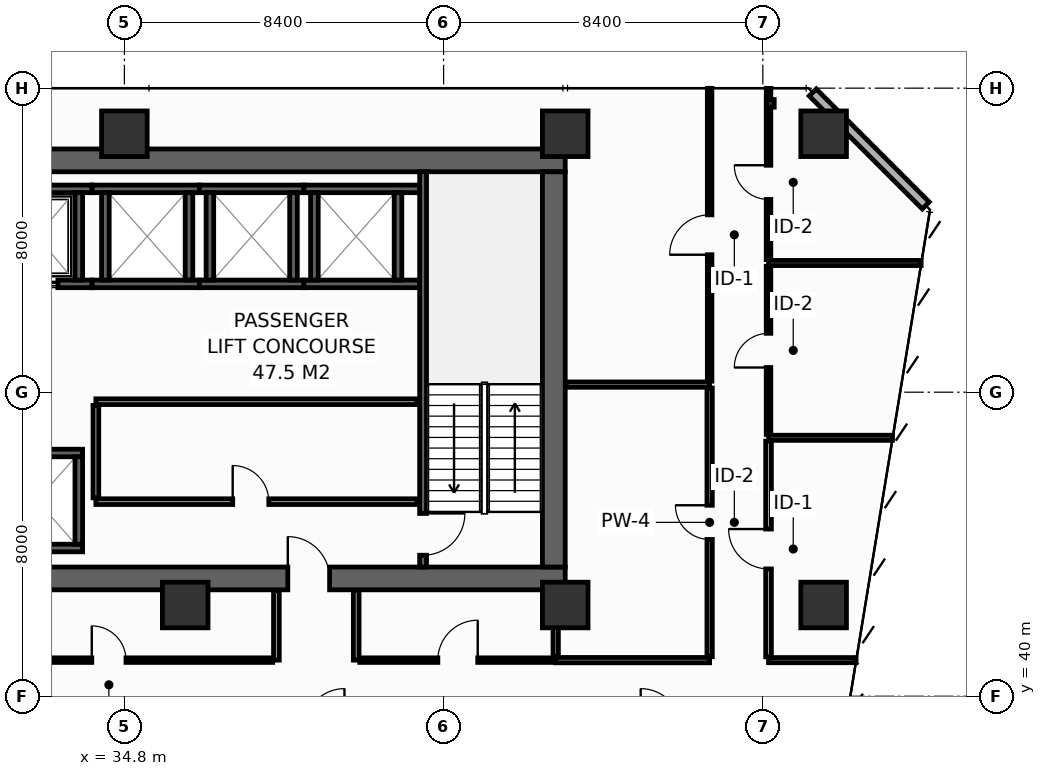
"""IFC4 building model, lengths in metres.
Left out: names, types, materials, properties, quantities, classifications, styles, units other than length and angle.
Written with IfcOpenShell. Run it as: python <this file> out.ifc"""

import sys

from ifc_helpers import new_model, si_unit, direction, frame, frame_2d, origin, origin_2d, place, context, subcontext, project, spatial, rectangle, hollow_rectangle, extrude, element, fill, save


model = new_model("IFC4")
c1 = context("Model", 3, precision=1e-05, world=origin(), true_north=direction((0.0, 1.0)))
c2 = subcontext(c1, "Body", "Model", "MODEL_VIEW")
j1 = project(units=[si_unit("LENGTHUNIT", "METRE"), si_unit("PLANEANGLEUNIT", "RADIAN")], contexts=[c1])
p1 = place(None, origin())
s1 = spatial("IfcSite", under=j1, at=p1, CompositionType="ELEMENT")
p2 = place(p1, origin())
s2 = spatial("IfcBuilding", under=s1, at=p2, CompositionType="ELEMENT")
p3 = place(p2, frame((0.0, 0.0, 47.2)))
s3 = spatial("IfcBuildingStorey", under=s2, at=p3, CompositionType="ELEMENT", Elevation=47.2)
p4 = place(p3, frame((13.5, 43.1, 0.0), z_axis=(0.0, 0.0, 1.0), x_axis=(1.0, 0.0, 0.0)))
e1 = element("IfcWall", 1, at=p4, inside=s3, PredefinedType="SHEAR", context=c2, shape_type="SweptSolid", body=[
    extrude(rectangle(XDim=32.9, YDim=0.6, at=frame_2d((16.45, 0.0))), origin(), (0.0, 0.0, 1.0), 4.15),
])
p5 = place(p4, frame((5.4, 0.0, 0.0)))
e2 = element("IfcOpeningElement", 2, at=p5, cuts=e1, PredefinedType="OPENING", context=c2, shape_type="SweptSolid", body=[
    extrude(rectangle(XDim=1.1, YDim=2.15, at=frame_2d((0.55, 1.075))), frame((0.0, 0.31, 0.0), z_axis=(0.0, -1.0, 0.0), x_axis=(1.0, 0.0, 0.0)), (0.0, 0.0, 1.0), 0.62),
])
p6 = place(p4, frame((25.6, 0.0, 0.0)))
e3 = element("IfcOpeningElement", 3, at=p6, cuts=e1, PredefinedType="OPENING", context=c2, shape_type="SweptSolid", body=[
    extrude(rectangle(XDim=1.1, YDim=2.15, at=frame_2d((0.55, 1.075))), frame((0.0, 0.31, 0.0), z_axis=(0.0, -1.0, 0.0), x_axis=(1.0, 0.0, 0.0)), (0.0, 0.0, 1.0), 0.62),
])
p7 = place(p3, frame((13.5, 54.1, 0.0), z_axis=(0.0, 0.0, 1.0), x_axis=(1.0, 0.0, 0.0)))
e4 = element("IfcWall", 4, at=p7, inside=s3, PredefinedType="SHEAR", context=c2, shape_type="SweptSolid", body=[
    extrude(rectangle(XDim=32.9, YDim=0.6, at=frame_2d((16.45, 0.0))), origin(), (0.0, 0.0, 1.0), 4.15),
])
p8 = place(p3, frame((46.1, 43.4, 0.0), z_axis=(0.0, 0.0, 1.0), x_axis=(0.0, 1.0, 0.0)))
e5 = element("IfcWall", 5, at=p8, inside=s3, PredefinedType="SHEAR", context=c2, shape_type="SweptSolid", body=[
    extrude(rectangle(XDim=10.4, YDim=0.6, at=frame_2d((5.2, 0.0))), origin(), (0.0, 0.0, 1.0), 4.15),
])
for number, where, z_axis, x_axis in (
    (6, (34.8, 54.8, 0.0), (0.0, 0.0, 1.0), (1.0, 0.0, 0.0)),
    (7, (46.4, 54.8, 0.0), (0.0, 0.0, 1.0), (1.0, 0.0, 0.0)),
    (8, (53.2, 54.8, 0.0), (0.0, 0.0, 1.0), (1.0, 0.0, 0.0)),
    (9, (36.4, 42.4, 0.0), (0.0, 0.0, 1.0), (1.0, 0.0, 0.0)),
    (10, (46.4, 42.4, 0.0), (0.0, 0.0, 1.0), (1.0, 0.0, 0.0)),
    (11, (53.2, 42.4, 0.0), (0.0, 0.0, 1.0), (1.0, 0.0, 0.0)),
):
    element("IfcColumn", number, at=place(p3, frame(where, z_axis=z_axis, x_axis=x_axis)), inside=s3, PredefinedType="COLUMN", context=c2, shape_type="SweptSolid", body=[
        extrude(hollow_rectangle(XDim=1.2, YDim=1.2, WallThickness=0.055, at=origin_2d()), origin(), (0.0, 0.0, 1.0), 4.4),
    ])
p9 = place(p3, frame((51.8, 55.6, 0.0), z_axis=(0.0, 0.0, 1.0), x_axis=(1.0, 0.0, 0.0)))
e12 = element("IfcColumn", 12, at=p9, inside=s3, PredefinedType="PILASTER", context=c2, shape_type="SweptSolid", body=[
    extrude(hollow_rectangle(XDim=0.2, YDim=0.2, WallThickness=0.01, at=origin_2d()), origin(), (0.0, 0.0, 1.0), 4.4),
])
p10 = place(p3, frame((31.125, 50.85, 0.0), z_axis=(0.0, 0.0, 1.0), x_axis=(1.0, 0.0, 0.0)))
e13 = element("IfcWall", 13, at=p10, inside=s3, PredefinedType="SHEAR", context=c2, shape_type="SweptSolid", body=[
    extrude(rectangle(XDim=2.825, YDim=0.2, at=frame_2d((1.413, 0.0))), origin(), (0.0, 0.0, 1.0), 4.15),
])
p11 = place(p10, frame((0.825, 0.0, 0.0)))
e14 = element("IfcOpeningElement", 14, at=p11, cuts=e13, PredefinedType="OPENING", context=c2, shape_type="SweptSolid", body=[
    extrude(rectangle(XDim=1.1, YDim=2.2, at=frame_2d((0.55, 1.1))), frame((0.0, 0.11, 0.0), z_axis=(0.0, -1.0, 0.0), x_axis=(1.0, 0.0, 0.0)), (0.0, 0.0, 1.0), 0.22),
])
p12 = place(p3, frame((31.125, 53.35, 0.0), z_axis=(0.0, 0.0, 1.0), x_axis=(1.0, 0.0, 0.0)))
e15 = element("IfcWall", 15, at=p12, inside=s3, PredefinedType="SHEAR", context=c2, shape_type="SweptSolid", body=[
    extrude(rectangle(XDim=2.825, YDim=0.2, at=frame_2d((1.413, 0.0))), origin(), (0.0, 0.0, 1.0), 4.15),
])
p13 = place(p3, frame((33.6, 50.95, 0.0), z_axis=(0.0, 0.0, 1.0), x_axis=(0.0, 1.0, 0.0)))
e16 = element("IfcWall", 16, at=p13, inside=s3, PredefinedType="SHEAR", context=c2, shape_type="SweptSolid", body=[
    extrude(rectangle(XDim=2.3, YDim=0.2, at=frame_2d((1.15, 0.0))), origin(), (0.0, 0.0, 1.0), 4.15),
])
for number, where, z_axis, x_axis in (
    (17, (31.125, 43.9, 0.0), (0.0, 0.0, 1.0), (1.0, 0.0, 0.0)),
    (18, (31.125, 46.4, 0.0), (0.0, 0.0, 1.0), (1.0, 0.0, 0.0)),
):
    element("IfcWall", number, at=place(p3, frame(where, z_axis=z_axis, x_axis=x_axis)), inside=s3, PredefinedType="SHEAR", context=c2, shape_type="SweptSolid", body=[
        extrude(rectangle(XDim=2.575, YDim=0.2, at=frame_2d((1.288, 0.0))), origin(), (0.0, 0.0, 1.0), 4.15),
    ])
p14 = place(p3, frame((33.6, 44.0, 0.0), z_axis=(0.0, 0.0, 1.0), x_axis=(0.0, 1.0, 0.0)))
e19 = element("IfcWall", 19, at=p14, inside=s3, PredefinedType="SHEAR", context=c2, shape_type="SweptSolid", body=[
    extrude(rectangle(XDim=2.3, YDim=0.2, at=frame_2d((1.15, 0.0))), origin(), (0.0, 0.0, 1.0), 4.15),
])
for number, where, z_axis, x_axis in (
    (20, (33.95, 50.85, 0.0), (0.0, 0.0, 1.0), (1.0, 0.0, 0.0)),
    (21, (33.95, 53.35, 0.0), (0.0, 0.0, 1.0), (1.0, 0.0, 0.0)),
):
    element("IfcWall", number, at=place(p3, frame(where, z_axis=z_axis, x_axis=x_axis)), inside=s3, PredefinedType="SHEAR", context=c2, shape_type="SweptSolid", body=[
        extrude(rectangle(XDim=2.825, YDim=0.2, at=frame_2d((1.413, 0.0))), origin(), (0.0, 0.0, 1.0), 4.15),
    ])
for number, where, z_axis, x_axis in (
    (22, (34.3, 50.95, 0.0), (0.0, 0.0, 1.0), (0.0, 1.0, 0.0)),
    (23, (36.5, 50.95, 0.0), (0.0, 0.0, 1.0), (0.0, 1.0, 0.0)),
):
    element("IfcWall", number, at=place(p3, frame(where, z_axis=z_axis, x_axis=x_axis)), inside=s3, PredefinedType="SHEAR", context=c2, shape_type="SweptSolid", body=[
        extrude(rectangle(XDim=2.3, YDim=0.2, at=frame_2d((1.15, 0.0))), origin(), (0.0, 0.0, 1.0), 4.15),
    ])
for number, where, z_axis, x_axis in (
    (24, (36.775, 50.85, 0.0), (0.0, 0.0, 1.0), (1.0, 0.0, 0.0)),
    (25, (36.775, 53.35, 0.0), (0.0, 0.0, 1.0), (1.0, 0.0, 0.0)),
):
    element("IfcWall", number, at=place(p3, frame(where, z_axis=z_axis, x_axis=x_axis)), inside=s3, PredefinedType="SHEAR", context=c2, shape_type="SweptSolid", body=[
        extrude(rectangle(XDim=2.75, YDim=0.2, at=frame_2d((1.375, 0.0))), origin(), (0.0, 0.0, 1.0), 4.15),
    ])
for number, where, z_axis, x_axis in (
    (26, (37.05, 50.95, 0.0), (0.0, 0.0, 1.0), (0.0, 1.0, 0.0)),
    (27, (39.25, 50.95, 0.0), (0.0, 0.0, 1.0), (0.0, 1.0, 0.0)),
):
    element("IfcWall", number, at=place(p3, frame(where, z_axis=z_axis, x_axis=x_axis)), inside=s3, PredefinedType="SHEAR", context=c2, shape_type="SweptSolid", body=[
        extrude(rectangle(XDim=2.3, YDim=0.2, at=frame_2d((1.15, 0.0))), origin(), (0.0, 0.0, 1.0), 4.15),
    ])
for number, where, z_axis, x_axis in (
    (28, (39.525, 50.85, 0.0), (0.0, 0.0, 1.0), (1.0, 0.0, 0.0)),
    (29, (39.525, 53.35, 0.0), (0.0, 0.0, 1.0), (1.0, 0.0, 0.0)),
):
    element("IfcWall", number, at=place(p3, frame(where, z_axis=z_axis, x_axis=x_axis)), inside=s3, PredefinedType="SHEAR", context=c2, shape_type="SweptSolid", body=[
        extrude(rectangle(XDim=3.045, YDim=0.2, at=frame_2d((1.522, 0.0))), origin(), (0.0, 0.0, 1.0), 4.15),
    ])
for number, where, z_axis, x_axis in (
    (30, (39.8, 50.95, 0.0), (0.0, 0.0, 1.0), (0.0, 1.0, 0.0)),
    (31, (42.0, 50.95, 0.0), (0.0, 0.0, 1.0), (0.0, 1.0, 0.0)),
):
    element("IfcWall", number, at=place(p3, frame(where, z_axis=z_axis, x_axis=x_axis)), inside=s3, PredefinedType="SHEAR", context=c2, shape_type="SweptSolid", body=[
        extrude(rectangle(XDim=2.3, YDim=0.2, at=frame_2d((1.15, 0.0))), origin(), (0.0, 0.0, 1.0), 4.15),
    ])
p15 = place(p3, frame((42.66, 53.8, 0.0), z_axis=(0.0, 0.0, 1.0), x_axis=(0.0, -1.0, 0.0)))
e32 = element("IfcWall", 32, at=p15, inside=s3, PredefinedType="SHEAR", context=c2, shape_type="SweptSolid", body=[
    extrude(rectangle(XDim=10.4, YDim=0.18, at=frame_2d((5.2, 0.0))), origin(), (0.0, 0.0, 1.0), 4.15),
])
p16 = place(p15, frame((8.99, 0.0, 0.0)))
e33 = element("IfcOpeningElement", 33, at=p16, cuts=e32, PredefinedType="OPENING", context=c2, shape_type="SweptSolid", body=[
    extrude(rectangle(XDim=1.1, YDim=2.15, at=frame_2d((0.55, 1.075))), frame((0.0, 0.1, 0.0), z_axis=(0.0, -1.0, 0.0), x_axis=(1.0, 0.0, 0.0)), (0.0, 0.0, 1.0), 0.2),
])
p17 = place(p3, frame((34.05, 45.12, 0.0), z_axis=(0.0, 0.0, 1.0), x_axis=(1.0, 0.0, 0.0)))
e34 = element("IfcWall", 34, at=p17, inside=s3, PredefinedType="PARTITIONING", context=c2, shape_type="SweptSolid", body=[
    extrude(rectangle(XDim=8.45, YDim=0.15, at=frame_2d((4.225, 0.0))), origin(), (0.0, 0.0, 1.0), 4.15),
])
p18 = place(p17, frame((3.6, 0.0, 0.0)))
e35 = element("IfcOpeningElement", 35, at=p18, cuts=e34, PredefinedType="OPENING", context=c2, shape_type="SweptSolid", body=[
    extrude(rectangle(XDim=0.95, YDim=2.15, at=frame_2d((0.475, 1.075))), frame((0.0, 0.085, 0.0), z_axis=(0.0, -1.0, 0.0), x_axis=(1.0, 0.0, 0.0)), (0.0, 0.0, 1.0), 0.17),
])
p19 = place(p3, frame((34.05, 47.75, 0.0), z_axis=(0.0, 0.0, 1.0), x_axis=(1.0, 0.0, 0.0)))
e36 = element("IfcWall", 36, at=p19, inside=s3, PredefinedType="PARTITIONING", context=c2, shape_type="SweptSolid", body=[
    extrude(rectangle(XDim=8.45, YDim=0.15, at=frame_2d((4.225, 0.0))), origin(), (0.0, 0.0, 1.0), 4.15),
])
p20 = place(p3, frame((34.05, 45.22, 0.0), z_axis=(0.0, 0.0, 1.0), x_axis=(0.0, 1.0, 0.0)))
e37 = element("IfcWall", 37, at=p20, inside=s3, PredefinedType="PARTITIONING", context=c2, shape_type="SweptSolid", body=[
    extrude(rectangle(XDim=2.43, YDim=0.15, at=frame_2d((1.215, 0.0))), origin(), (0.0, 0.0, 1.0), 4.15),
])
p21 = place(p3, frame((55.887, 52.913, 0.0), z_axis=(0.0, 0.0, 1.0), x_axis=(-0.707106781187, 0.707106781187, 0.0)))
e38 = element("IfcWall", 38, at=p21, inside=s3, PredefinedType="STANDARD", context=c2, shape_type="SweptSolid", body=[
    extrude(rectangle(XDim=4.206, YDim=0.26, at=frame_2d((2.103, 0.0))), origin(), (0.0, 0.0, 1.0), 4.15),
])
p22 = place(p3, frame((46.15, 40.95, 0.0), z_axis=(0.0, 0.0, 1.0), x_axis=(1.0, 0.0, 0.0)))
e39 = element("IfcWall", 39, at=p22, inside=s3, PredefinedType="PARTITIONING", context=c2, shape_type="SweptSolid", body=[
    extrude(rectangle(XDim=4.05, YDim=0.14, at=frame_2d((2.025, 0.0))), origin(), (0.0, 0.0, 1.0), 4.15),
])
p23 = place(p3, frame((46.15, 41.04, 0.0), z_axis=(0.0, 0.0, 1.0), x_axis=(0.0, 1.0, 0.0)))
e40 = element("IfcWall", 40, at=p23, inside=s3, PredefinedType="PARTITIONING", context=c2, shape_type="SweptSolid", body=[
    extrude(rectangle(XDim=1.74, YDim=0.14, at=frame_2d((0.87, 0.0))), origin(), (0.0, 0.0, 1.0), 4.15),
])
p24 = place(p3, frame((46.42, 48.2, 0.0), z_axis=(0.0, 0.0, 1.0), x_axis=(1.0, 0.0, 0.0)))
e41 = element("IfcWall", 41, at=p24, inside=s3, PredefinedType="PARTITIONING", context=c2, shape_type="SweptSolid", body=[
    extrude(rectangle(XDim=3.78, YDim=0.14, at=frame_2d((1.89, 0.0))), origin(), (0.0, 0.0, 1.0), 4.15),
])
p25 = place(p3, frame((50.2, 41.04, 0.0), z_axis=(0.0, 0.0, 1.0), x_axis=(0.0, 1.0, 0.0)))
e42 = element("IfcWall", 42, at=p25, inside=s3, PredefinedType="PARTITIONING", context=c2, shape_type="SweptSolid", body=[
    extrude(rectangle(XDim=7.07, YDim=0.14, at=frame_2d((3.535, 0.0))), origin(), (0.0, 0.0, 1.0), 3.335),
])
p26 = place(p25, frame((3.085, 0.0, 0.0)))
e43 = element("IfcOpeningElement", 43, at=p26, cuts=e42, PredefinedType="OPENING", context=c2, shape_type="SweptSolid", body=[
    extrude(rectangle(XDim=0.9, YDim=2.1, at=frame_2d((0.45, 1.05))), frame((0.0, 0.08, 0.0), z_axis=(0.0, -1.0, 0.0), x_axis=(1.0, 0.0, 0.0)), (0.0, 0.0, 1.0), 0.16),
])
p27 = place(p3, frame((50.2, 48.29, 0.0), z_axis=(0.0, 0.0, 1.0), x_axis=(0.0, 1.0, 0.0)))
e44 = element("IfcWall", 44, at=p27, inside=s3, PredefinedType="PARTITIONING", context=c2, shape_type="SweptSolid", body=[
    extrude(rectangle(XDim=7.705, YDim=0.12, at=frame_2d((3.853, 0.0))), origin(), (0.0, 0.0, 1.0), 3.435),
])
p28 = place(p27, frame((3.327, 0.0, 0.0)))
e45 = element("IfcOpeningElement", 45, at=p28, cuts=e44, PredefinedType="OPENING", context=c2, shape_type="SweptSolid", body=[
    extrude(rectangle(XDim=1.05, YDim=2.15, at=frame_2d((0.525, 1.075))), frame((0.0, 0.07, 0.0), z_axis=(0.0, -1.0, 0.0), x_axis=(1.0, 0.0, 0.0)), (0.0, 0.0, 1.0), 0.14),
])
p29 = place(p3, frame((51.75, 40.95, 0.0), z_axis=(0.0, 0.0, 1.0), x_axis=(1.0, 0.0, 0.0)))
e46 = element("IfcWall", 46, at=p29, inside=s3, PredefinedType="PARTITIONING", context=c2, shape_type="SweptSolid", body=[
    extrude(rectangle(XDim=2.303, YDim=0.135, at=frame_2d((1.151, 0.0))), origin(), (0.0, 0.0, 1.0), 3.635),
])
p30 = place(p3, frame((51.75, 46.8, 0.0), z_axis=(0.0, 0.0, 1.0), x_axis=(1.0, 0.0, 0.0)))
e47 = element("IfcWall", 47, at=p30, inside=s3, PredefinedType="PARTITIONING", context=c2, shape_type="SweptSolid", body=[
    extrude(rectangle(XDim=3.262, YDim=0.135, at=frame_2d((1.631, 0.0))), origin(), (0.0, 0.0, 1.0), 3.335),
])
p31 = place(p3, frame((51.75, 51.4, 0.0), z_axis=(0.0, 0.0, 1.0), x_axis=(1.0, 0.0, 0.0)))
e48 = element("IfcWall", 48, at=p31, inside=s3, PredefinedType="PARTITIONING", context=c2, shape_type="SweptSolid", body=[
    extrude(rectangle(XDim=4.015, YDim=0.135, at=frame_2d((2.008, 0.0))), origin(), (0.0, 0.0, 1.0), 3.335),
])
p32 = place(p3, frame((51.75, 41.038, 0.0), z_axis=(0.0, 0.0, 1.0), x_axis=(0.0, 1.0, 0.0)))
e49 = element("IfcWall", 49, at=p32, inside=s3, PredefinedType="PARTITIONING", context=c2, shape_type="SweptSolid", body=[
    extrude(rectangle(XDim=5.675, YDim=0.15, at=frame_2d((2.837, 0.0))), origin(), (0.0, 0.0, 1.0), 3.335),
])
p33 = place(p32, frame((2.312, 0.0, 0.0)))
e50 = element("IfcOpeningElement", 50, at=p33, cuts=e49, PredefinedType="OPENING", context=c2, shape_type="SweptSolid", body=[
    extrude(rectangle(XDim=1.05, YDim=2.15, at=frame_2d((0.525, 1.075))), frame((0.0, 0.085, 0.0), z_axis=(0.0, -1.0, 0.0), x_axis=(1.0, 0.0, 0.0)), (0.0, 0.0, 1.0), 0.17),
])
p34 = place(p3, frame((51.75, 46.887, 0.0), z_axis=(0.0, 0.0, 1.0), x_axis=(0.0, 1.0, 0.0)))
e51 = element("IfcWall", 51, at=p34, inside=s3, PredefinedType="PARTITIONING", context=c2, shape_type="SweptSolid", body=[
    extrude(rectangle(XDim=4.425, YDim=0.12, at=frame_2d((2.212, 0.0))), origin(), (0.0, 0.0, 1.0), 4.15),
])
p35 = place(p34, frame((1.762, 0.0, 0.0)))
e52 = element("IfcOpeningElement", 52, at=p35, cuts=e51, PredefinedType="OPENING", context=c2, shape_type="SweptSolid", body=[
    extrude(rectangle(XDim=0.9, YDim=2.1, at=frame_2d((0.45, 1.05))), frame((0.0, 0.07, 0.0), z_axis=(0.0, -1.0, 0.0), x_axis=(1.0, 0.0, 0.0)), (0.0, 0.0, 1.0), 0.14),
])
p36 = place(p3, frame((51.75, 51.488, 0.0), z_axis=(0.0, 0.0, 1.0), x_axis=(0.0, 1.0, 0.0)))
e53 = element("IfcWall", 53, at=p36, inside=s3, PredefinedType="PARTITIONING", context=c2, shape_type="SweptSolid", body=[
    extrude(rectangle(XDim=4.508, YDim=0.12, at=frame_2d((2.254, 0.0))), origin(), (0.0, 0.0, 1.0), 3.435),
])
p37 = place(p36, frame((1.584, 0.0, 0.0)))
e54 = element("IfcOpeningElement", 54, at=p37, cuts=e53, PredefinedType="OPENING", context=c2, shape_type="SweptSolid", body=[
    extrude(rectangle(XDim=0.9, YDim=2.1, at=frame_2d((0.45, 1.05))), frame((0.0, 0.07, 0.0), z_axis=(0.0, -1.0, 0.0), x_axis=(1.0, 0.0, 0.0)), (0.0, 0.0, 1.0), 0.14),
])
for number, where, z_axis, x_axis in (
    (55, (38.8, 40.95, 0.0), (0.0, 0.0, 1.0), (0.0, 1.0, 0.0)),
    (56, (40.9, 40.95, 0.0), (0.0, 0.0, 1.0), (0.0, 1.0, 0.0)),
):
    element("IfcWall", number, at=place(p3, frame(where, z_axis=z_axis, x_axis=x_axis)), inside=s3, PredefinedType="PARTITIONING", context=c2, shape_type="SweptSolid", body=[
        extrude(rectangle(XDim=1.83, YDim=0.15, at=frame_2d((0.915, 0.0))), origin(), (0.0, 0.0, 1.0), 4.15),
    ])
p38 = place(p3, frame((30.08, 40.95, 0.0), z_axis=(0.0, 0.0, 1.0), x_axis=(1.0, 0.0, 0.0)))
e57 = element("IfcWall", 57, at=p38, inside=s3, PredefinedType="PARTITIONING", context=c2, shape_type="SweptSolid", body=[
    extrude(rectangle(XDim=8.625, YDim=0.12, at=frame_2d((4.312, 0.0))), origin(), (0.0, 0.0, 1.0), 3.335),
])
p39 = place(p38, frame((3.862, 0.0, 0.0)))
e58 = element("IfcOpeningElement", 58, at=p39, cuts=e57, PredefinedType="OPENING", context=c2, shape_type="SweptSolid", body=[
    extrude(rectangle(XDim=0.9, YDim=2.1, at=frame_2d((0.45, 1.05))), frame((0.0, 0.07, 0.0), z_axis=(0.0, -1.0, 0.0), x_axis=(1.0, 0.0, 0.0)), (0.0, 0.0, 1.0), 0.14),
])
p40 = place(p3, frame((40.995, 40.95, 0.0), z_axis=(0.0, 0.0, 1.0), x_axis=(1.0, 0.0, 0.0)))
e59 = element("IfcWall", 59, at=p40, inside=s3, PredefinedType="PARTITIONING", context=c2, shape_type="SweptSolid", body=[
    extrude(rectangle(XDim=5.155, YDim=0.12, at=frame_2d((2.577, 0.0))), origin(), (0.0, 0.0, 1.0), 4.15),
])
p41 = place(p40, frame((2.053, 0.0, 0.0)))
e60 = element("IfcOpeningElement", 60, at=p41, cuts=e59, PredefinedType="OPENING", context=c2, shape_type="SweptSolid", body=[
    extrude(rectangle(XDim=1.05, YDim=2.15, at=frame_2d((0.525, 1.075))), frame((0.0, 0.07, 0.0), z_axis=(0.0, -1.0, 0.0), x_axis=(1.0, 0.0, 0.0)), (0.0, 0.0, 1.0), 0.14),
])
p42 = place(p11, origin())
e61 = element("IfcDoor", 61, at=p42, inside=s3, OperationType="SLIDING_TO_LEFT", PredefinedType="DOOR", context=c2, shape_type="SweptSolid", body=[
    extrude(rectangle(XDim=1.1, YDim=2.2, at=frame_2d((0.55, 1.1))), frame((0.0, 0.025, 0.0), z_axis=(0.0, -1.0, 0.0), x_axis=(1.0, 0.0, 0.0)), (0.0, 0.0, 1.0), 0.05),
])
fill(e14, e61)
p43 = place(p16, origin())
e62 = element("IfcDoor", 62, at=p43, inside=s3, OperationType="SINGLE_SWING_LEFT", PredefinedType="DOOR", context=c2, shape_type="SweptSolid", body=[
    extrude(rectangle(XDim=1.1, YDim=2.15, at=frame_2d((0.55, 1.075))), frame((0.0, 0.025, 0.0), z_axis=(0.0, -1.0, 0.0), x_axis=(1.0, 0.0, 0.0)), (0.0, 0.0, 1.0), 0.05),
])
fill(e33, e62)
p44 = place(p6, origin())
e63 = element("IfcDoor", 63, at=p44, inside=s3, OperationType="SINGLE_SWING_LEFT", PredefinedType="DOOR", context=c2, shape_type="SweptSolid", body=[
    extrude(rectangle(XDim=1.1, YDim=2.15, at=frame_2d((0.55, 1.075))), frame((0.0, 0.025, 0.0), z_axis=(0.0, -1.0, 0.0), x_axis=(1.0, 0.0, 0.0)), (0.0, 0.0, 1.0), 0.05),
])
fill(e3, e63)
p45 = place(p18, origin())
e64 = element("IfcDoor", 64, at=p45, inside=s3, OperationType="SINGLE_SWING_LEFT", PredefinedType="DOOR", context=c2, shape_type="SweptSolid", body=[
    extrude(rectangle(XDim=0.95, YDim=2.15, at=frame_2d((0.475, 1.075))), frame((0.0, 0.025, 0.0), z_axis=(0.0, -1.0, 0.0), x_axis=(1.0, 0.0, 0.0)), (0.0, 0.0, 1.0), 0.05),
])
fill(e35, e64)
p46 = place(p26, origin())
e65 = element("IfcDoor", 65, at=p46, inside=s3, OperationType="SINGLE_SWING_RIGHT", PredefinedType="DOOR", context=c2, shape_type="SweptSolid", body=[
    extrude(rectangle(XDim=0.9, YDim=2.1, at=frame_2d((0.45, 1.05))), frame((0.0, 0.025, 0.0), z_axis=(0.0, -1.0, 0.0), x_axis=(1.0, 0.0, 0.0)), (0.0, 0.0, 1.0), 0.05),
])
fill(e43, e65)
p47 = place(p28, origin())
e66 = element("IfcDoor", 66, at=p47, inside=s3, OperationType="SINGLE_SWING_LEFT", PredefinedType="DOOR", context=c2, shape_type="SweptSolid", body=[
    extrude(rectangle(XDim=1.05, YDim=2.15, at=frame_2d((0.525, 1.075))), frame((0.0, 0.025, 0.0), z_axis=(0.0, -1.0, 0.0), x_axis=(1.0, 0.0, 0.0)), (0.0, 0.0, 1.0), 0.05),
])
fill(e45, e66)
p48 = place(p33, origin())
e67 = element("IfcDoor", 67, at=p48, inside=s3, OperationType="SINGLE_SWING_RIGHT", PredefinedType="DOOR", context=c2, shape_type="SweptSolid", body=[
    extrude(rectangle(XDim=1.05, YDim=2.15, at=frame_2d((0.525, 1.075))), frame((0.0, 0.025, 0.0), z_axis=(0.0, -1.0, 0.0), x_axis=(1.0, 0.0, 0.0)), (0.0, 0.0, 1.0), 0.05),
])
fill(e50, e67)
p49 = place(p35, origin())
e68 = element("IfcDoor", 68, at=p49, inside=s3, OperationType="SINGLE_SWING_LEFT", PredefinedType="DOOR", context=c2, shape_type="SweptSolid", body=[
    extrude(rectangle(XDim=0.9, YDim=2.1, at=frame_2d((0.45, 1.05))), frame((0.0, 0.025, 0.0), z_axis=(0.0, -1.0, 0.0), x_axis=(1.0, 0.0, 0.0)), (0.0, 0.0, 1.0), 0.05),
])
fill(e52, e68)
p50 = place(p37, origin())
e69 = element("IfcDoor", 69, at=p50, inside=s3, OperationType="SINGLE_SWING_RIGHT", PredefinedType="DOOR", context=c2, shape_type="SweptSolid", body=[
    extrude(rectangle(XDim=0.9, YDim=2.1, at=frame_2d((0.45, 1.05))), frame((0.0, 0.025, 0.0), z_axis=(0.0, -1.0, 0.0), x_axis=(1.0, 0.0, 0.0)), (0.0, 0.0, 1.0), 0.05),
])
fill(e54, e69)
p51 = place(p39, origin())
e70 = element("IfcDoor", 70, at=p51, inside=s3, OperationType="SINGLE_SWING_LEFT", PredefinedType="DOOR", context=c2, shape_type="SweptSolid", body=[
    extrude(rectangle(XDim=0.9, YDim=2.1, at=frame_2d((0.45, 1.05))), frame((0.0, 0.025, 0.0), z_axis=(0.0, -1.0, 0.0), x_axis=(1.0, 0.0, 0.0)), (0.0, 0.0, 1.0), 0.05),
])
fill(e58, e70)
p52 = place(p41, origin())
e71 = element("IfcDoor", 71, at=p52, inside=s3, OperationType="SINGLE_SWING_RIGHT", PredefinedType="DOOR", context=c2, shape_type="SweptSolid", body=[
    extrude(rectangle(XDim=1.05, YDim=2.15, at=frame_2d((0.525, 1.075))), frame((0.0, 0.025, 0.0), z_axis=(0.0, -1.0, 0.0), x_axis=(1.0, 0.0, 0.0)), (0.0, 0.0, 1.0), 0.05),
])
fill(e60, e71)
save(model, sys.argv[1])
